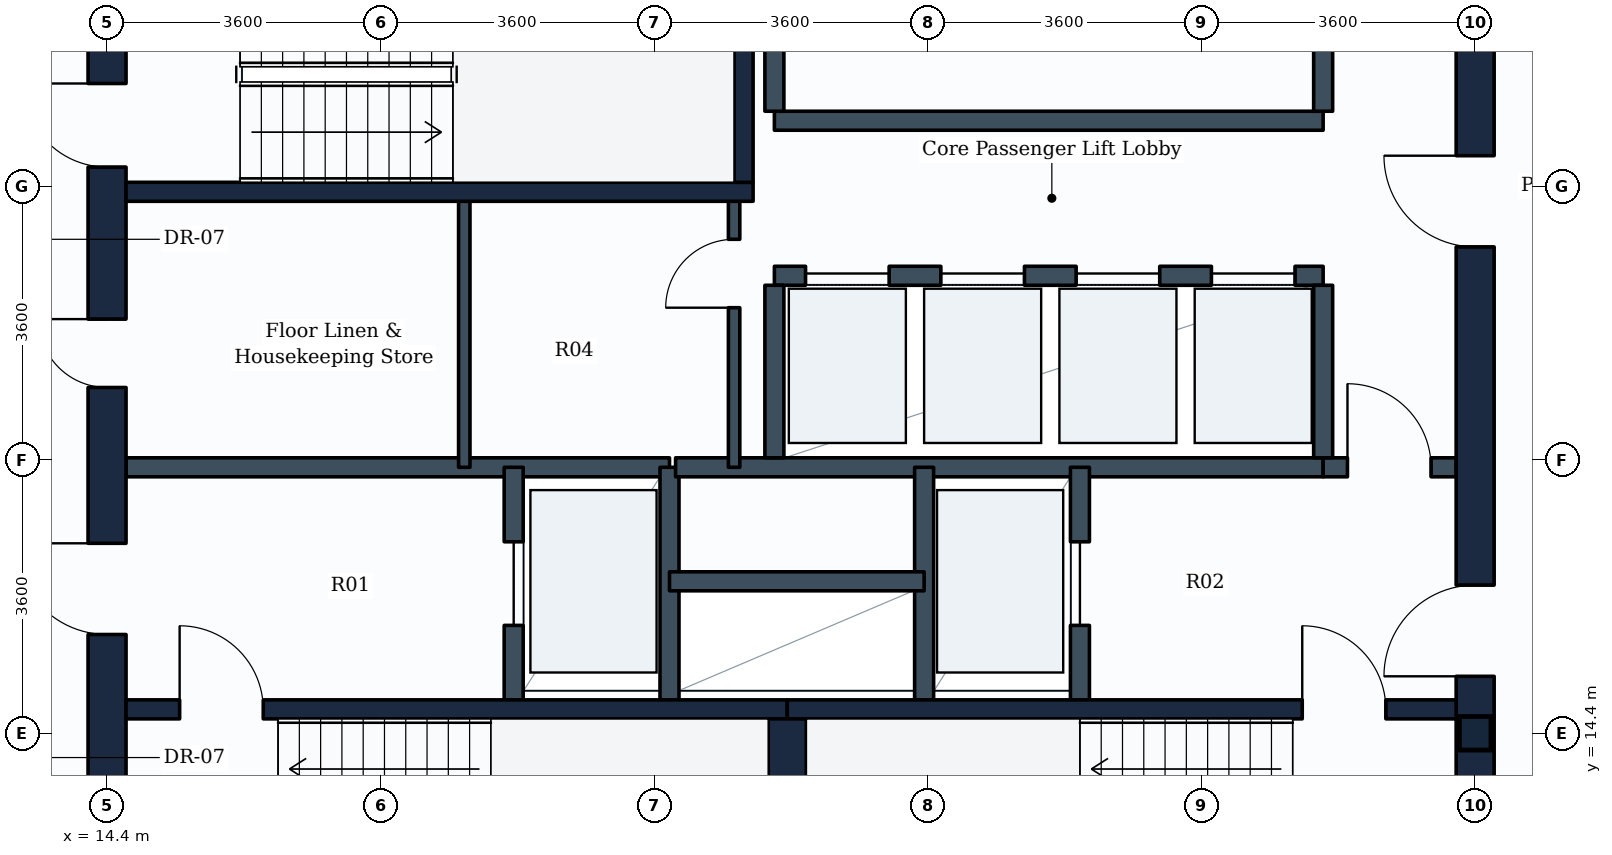
"""IFC4 building model, lengths in metres.
Left out: names, types, materials, properties, quantities, classifications, styles, units other than length and angle.
Written with IfcOpenShell. Run it as: python <this file> out.ifc"""

import sys

from ifc_helpers import new_model, si_unit, direction, frame, frame_2d, origin, origin_2d, place, context, subcontext, project, spatial, rectangle, i_section, extrude, element, fill, save


model = new_model("IFC4")
c1 = context("Model", 3, precision=1e-05, world=origin(), true_north=direction((0.0, 1.0)))
c2 = subcontext(c1, "Body", "Model", "MODEL_VIEW")
j1 = project(units=[si_unit("LENGTHUNIT", "METRE"), si_unit("PLANEANGLEUNIT", "RADIAN")], contexts=[c1])
p1 = place(None, origin())
s1 = spatial("IfcSite", under=j1, at=p1, CompositionType="ELEMENT")
p2 = place(p1, origin())
s2 = spatial("IfcBuilding", under=s1, at=p2, CompositionType="ELEMENT")
p3 = place(p2, frame((0.0, 0.0, 131.4)))
s3 = spatial("IfcBuildingStorey", under=s2, at=p3, CompositionType="ELEMENT", Elevation=131.4)
p4 = place(p3, frame((32.4, 14.4, 0.0), z_axis=(0.0, 0.0, 1.0), x_axis=(1.0, 0.0, 0.0)))
e1 = element("IfcColumn", 1, at=p4, inside=s3, PredefinedType="COLUMN", context=c2, shape_type="SweptSolid", body=[
    extrude(i_section(OverallWidth=0.416, OverallDepth=0.442, WebThickness=0.025, FlangeThickness=0.041, FilletRadius=0.015, at=origin_2d()), origin(), (0.0, 0.0, 1.0), 3.8),
])
p5 = place(p3, frame((14.4, 10.8, 0.0), z_axis=(0.0, 0.0, 1.0), x_axis=(0.0, 1.0, 0.0)))
e2 = element("IfcWall", 2, at=p5, inside=s3, PredefinedType="SHEAR", context=c2, shape_type="SweptSolid", body=[
    extrude(rectangle(XDim=14.4, YDim=0.5, at=frame_2d((7.2, 0.0))), origin(), (0.0, 0.0, 1.0), 3.55),
])
p6 = place(p5, frame((11.05, 0.0, 0.0)))
e3 = element("IfcOpeningElement", 3, at=p6, cuts=e2, PredefinedType="OPENING", context=c2, shape_type="SweptSolid", body=[
    extrude(rectangle(XDim=1.1, YDim=2.1, at=frame_2d((0.55, 1.05))), frame((0.0, 0.26, 0.0), z_axis=(0.0, -1.0, 0.0), x_axis=(1.0, 0.0, 0.0)), (0.0, 0.0, 1.0), 0.52),
])
p7 = place(p5, frame((4.9, 0.0, 0.0)))
e4 = element("IfcOpeningElement", 4, at=p7, cuts=e2, PredefinedType="OPENING", context=c2, shape_type="SweptSolid", body=[
    extrude(rectangle(XDim=1.2, YDim=2.1, at=frame_2d((0.6, 1.05))), frame((0.0, 0.26, 0.0), z_axis=(0.0, -1.0, 0.0), x_axis=(1.0, 0.0, 0.0)), (0.0, 0.0, 1.0), 0.52),
])
p8 = place(p5, frame((8.15, 0.0, 0.0)))
e5 = element("IfcOpeningElement", 5, at=p8, cuts=e2, PredefinedType="OPENING", context=c2, shape_type="SweptSolid", body=[
    extrude(rectangle(XDim=0.9, YDim=2.1, at=frame_2d((0.45, 1.05))), frame((0.0, 0.26, 0.0), z_axis=(0.0, -1.0, 0.0), x_axis=(1.0, 0.0, 0.0)), (0.0, 0.0, 1.0), 0.52),
])
p9 = place(p3, frame((32.4, 10.8, 0.0), z_axis=(0.0, 0.0, 1.0), x_axis=(0.0, 1.0, 0.0)))
e6 = element("IfcWall", 6, at=p9, inside=s3, PredefinedType="SHEAR", context=c2, shape_type="SweptSolid", body=[
    extrude(rectangle(XDim=14.4, YDim=0.5, at=frame_2d((7.2, 0.0))), origin(), (0.0, 0.0, 1.0), 3.55),
])
p10 = place(p9, frame((4.35, 0.0, 0.0)))
e7 = element("IfcOpeningElement", 7, at=p10, cuts=e6, PredefinedType="OPENING", context=c2, shape_type="SweptSolid", body=[
    extrude(rectangle(XDim=1.2, YDim=2.1, at=frame_2d((0.6, 1.05))), frame((0.0, 0.26, 0.0), z_axis=(0.0, -1.0, 0.0), x_axis=(1.0, 0.0, 0.0)), (0.0, 0.0, 1.0), 0.52),
])
p11 = place(p9, frame((10.0, 0.0, 0.0)))
e8 = element("IfcOpeningElement", 8, at=p11, cuts=e6, PredefinedType="OPENING", context=c2, shape_type="SweptSolid", body=[
    extrude(rectangle(XDim=1.2, YDim=2.1, at=frame_2d((0.6, 1.05))), frame((0.0, 0.26, 0.0), z_axis=(0.0, -1.0, 0.0), x_axis=(1.0, 0.0, 0.0)), (0.0, 0.0, 1.0), 0.52),
])
p12 = place(p3, frame((14.65, 14.715, 0.0), z_axis=(0.0, 0.0, 1.0), x_axis=(1.0, 0.0, 0.0)))
e9 = element("IfcWall", 9, at=p12, inside=s3, PredefinedType="SHEAR", context=c2, shape_type="SweptSolid", body=[
    extrude(rectangle(XDim=8.7, YDim=0.25, at=frame_2d((4.35, 0.0))), origin(), (0.0, 0.0, 1.0), 3.55),
])
p13 = place(p12, frame((0.705, 0.0, 0.0)))
e10 = element("IfcOpeningElement", 10, at=p13, cuts=e9, PredefinedType="OPENING", context=c2, shape_type="SweptSolid", body=[
    extrude(rectangle(XDim=1.1, YDim=2.1, at=frame_2d((0.55, 1.05))), frame((0.0, 0.135, 0.0), z_axis=(0.0, -1.0, 0.0), x_axis=(1.0, 0.0, 0.0)), (0.0, 0.0, 1.0), 0.27),
])
p14 = place(p3, frame((23.35, 14.715, 0.0), z_axis=(0.0, 0.0, 1.0), x_axis=(1.0, 0.0, 0.0)))
e11 = element("IfcWall", 11, at=p14, inside=s3, PredefinedType="SHEAR", context=c2, shape_type="SweptSolid", body=[
    extrude(rectangle(XDim=8.8, YDim=0.25, at=frame_2d((4.4, 0.0))), origin(), (0.0, 0.0, 1.0), 3.55),
])
p15 = place(p14, frame((6.775, 0.0, 0.0)))
e12 = element("IfcOpeningElement", 12, at=p15, cuts=e11, PredefinedType="OPENING", context=c2, shape_type="SweptSolid", body=[
    extrude(rectangle(XDim=1.1, YDim=2.1, at=frame_2d((0.55, 1.05))), frame((0.0, 0.135, 0.0), z_axis=(0.0, -1.0, 0.0), x_axis=(1.0, 0.0, 0.0)), (0.0, 0.0, 1.0), 0.27),
])
p16 = place(p3, frame((23.35, 11.75, 0.0), z_axis=(0.0, 0.0, 1.0), x_axis=(0.0, 1.0, 0.0)))
e13 = element("IfcWall", 13, at=p16, inside=s3, PredefinedType="SHEAR", context=c2, shape_type="SweptSolid", body=[
    extrude(rectangle(XDim=2.84, YDim=0.5, at=frame_2d((1.42, 0.0))), origin(), (0.0, 0.0, 1.0), 3.55),
])
p17 = place(p3, frame((14.65, 21.525, 0.0), z_axis=(0.0, 0.0, 1.0), x_axis=(1.0, 0.0, 0.0)))
e14 = element("IfcWall", 14, at=p17, inside=s3, PredefinedType="SHEAR", context=c2, shape_type="SweptSolid", body=[
    extrude(rectangle(XDim=8.25, YDim=0.25, at=frame_2d((4.125, 0.0))), origin(), (0.0, 0.0, 1.0), 3.55),
])
p18 = place(p3, frame((22.775, 21.65, 0.0), z_axis=(0.0, 0.0, 1.0), x_axis=(0.0, 1.0, 0.0)))
e15 = element("IfcWall", 15, at=p18, inside=s3, PredefinedType="SHEAR", context=c2, shape_type="SweptSolid", body=[
    extrude(rectangle(XDim=2.84, YDim=0.25, at=frame_2d((1.42, 0.0))), origin(), (0.0, 0.0, 1.0), 3.55),
])
p19 = place(p3, frame((14.65, 17.9, 0.0), z_axis=(0.0, 0.0, 1.0), x_axis=(1.0, 0.0, 0.0)))
e16 = element("IfcWall", 16, at=p19, inside=s3, PredefinedType="PARTITIONING", context=c2, shape_type="SweptSolid", body=[
    extrude(rectangle(XDim=7.15, YDim=0.25, at=frame_2d((3.575, 0.0))), origin(), (0.0, 0.0, 1.0), 3.535),
])
p20 = place(p3, frame((19.75, 14.84, 0.0), z_axis=(0.0, 0.0, 1.0), x_axis=(0.0, 1.0, 0.0)))
e17 = element("IfcWall", 17, at=p20, inside=s3, PredefinedType="PARTITIONING", context=c2, shape_type="SweptSolid", body=[
    extrude(rectangle(XDim=3.06, YDim=0.25, at=frame_2d((1.53, 0.0))), origin(), (0.0, 0.0, 1.0), 3.535),
])
p21 = place(p20, frame((0.98, 0.0, 0.0)))
e18 = element("IfcOpeningElement", 18, at=p21, cuts=e17, PredefinedType="OPENING", context=c2, shape_type="SweptSolid", body=[
    extrude(rectangle(XDim=1.1, YDim=2.1, at=frame_2d((0.55, 1.05))), frame((0.0, 0.135, 0.0), z_axis=(0.0, -1.0, 0.0), x_axis=(1.0, 0.0, 0.0)), (0.0, 0.0, 1.0), 0.27),
])
p22 = place(p3, frame((21.8, 14.84, 0.0), z_axis=(0.0, 0.0, 1.0), x_axis=(0.0, 1.0, 0.0)))
e19 = element("IfcWall", 19, at=p22, inside=s3, PredefinedType="PARTITIONING", context=c2, shape_type="SweptSolid", body=[
    extrude(rectangle(XDim=3.06, YDim=0.25, at=frame_2d((1.53, 0.0))), origin(), (0.0, 0.0, 1.0), 3.535),
])
p23 = place(p3, frame((21.88, 17.9, 0.0), z_axis=(0.0, 0.0, 1.0), x_axis=(1.0, 0.0, 0.0)))
e20 = element("IfcWall", 20, at=p23, inside=s3, PredefinedType="PARTITIONING", context=c2, shape_type="SweptSolid", body=[
    extrude(rectangle(XDim=8.52, YDim=0.25, at=frame_2d((4.26, 0.0))), origin(), (0.0, 0.0, 1.0), 3.535),
])
p24 = place(p3, frame((30.4, 17.9, 0.0), z_axis=(0.0, 0.0, 1.0), x_axis=(1.0, 0.0, 0.0)))
e21 = element("IfcWall", 21, at=p24, inside=s3, PredefinedType="PARTITIONING", context=c2, shape_type="SweptSolid", body=[
    extrude(rectangle(XDim=1.75, YDim=0.25, at=frame_2d((0.875, 0.0))), origin(), (0.0, 0.0, 1.0), 3.535),
])
p25 = place(p24, frame((0.32, 0.0, 0.0)))
e22 = element("IfcOpeningElement", 22, at=p25, cuts=e21, PredefinedType="OPENING", context=c2, shape_type="SweptSolid", body=[
    extrude(rectangle(XDim=1.1, YDim=2.1, at=frame_2d((0.55, 1.05))), frame((0.0, 0.135, 0.0), z_axis=(0.0, -1.0, 0.0), x_axis=(1.0, 0.0, 0.0)), (0.0, 0.0, 1.0), 0.27),
])
p26 = place(p3, frame((25.15, 14.84, 0.0), z_axis=(0.0, 0.0, 1.0), x_axis=(0.0, 1.0, 0.0)))
e23 = element("IfcWall", 23, at=p26, inside=s3, PredefinedType="PARTITIONING", context=c2, shape_type="SweptSolid", body=[
    extrude(rectangle(XDim=3.06, YDim=0.25, at=frame_2d((1.53, 0.0))), origin(), (0.0, 0.0, 1.0), 3.535),
])
p27 = place(p3, frame((27.2, 14.84, 0.0), z_axis=(0.0, 0.0, 1.0), x_axis=(0.0, 1.0, 0.0)))
e24 = element("IfcWall", 24, at=p27, inside=s3, PredefinedType="PARTITIONING", context=c2, shape_type="SweptSolid", body=[
    extrude(rectangle(XDim=3.06, YDim=0.25, at=frame_2d((1.53, 0.0))), origin(), (0.0, 0.0, 1.0), 3.535),
])
p28 = place(p27, frame((0.98, 0.0, 0.0)))
e25 = element("IfcOpeningElement", 25, at=p28, cuts=e24, PredefinedType="OPENING", context=c2, shape_type="SweptSolid", body=[
    extrude(rectangle(XDim=1.1, YDim=2.1, at=frame_2d((0.55, 1.05))), frame((0.0, 0.135, 0.0), z_axis=(0.0, -1.0, 0.0), x_axis=(1.0, 0.0, 0.0)), (0.0, 0.0, 1.0), 0.27),
])
p29 = place(p3, frame((21.8, 16.4, 0.0), z_axis=(0.0, 0.0, 1.0), x_axis=(1.0, 0.0, 0.0)))
e26 = element("IfcWall", 26, at=p29, inside=s3, PredefinedType="PARTITIONING", context=c2, shape_type="SweptSolid", body=[
    extrude(rectangle(XDim=3.35, YDim=0.25, at=frame_2d((1.675, 0.0))), origin(), (0.0, 0.0, 1.0), 3.535),
])
p30 = place(p3, frame((23.18, 20.42, 0.0), z_axis=(0.0, 0.0, 1.0), x_axis=(1.0, 0.0, 0.0)))
e27 = element("IfcWall", 27, at=p30, inside=s3, PredefinedType="PARTITIONING", context=c2, shape_type="SweptSolid", body=[
    extrude(rectangle(XDim=7.22, YDim=0.25, at=frame_2d((3.61, 0.0))), origin(), (0.0, 0.0, 1.0), 3.535),
])
p31 = place(p30, frame((0.41, 0.0, 0.0)))
e28 = element("IfcOpeningElement", 28, at=p31, cuts=e27, PredefinedType="OPENING", context=c2, shape_type="SweptSolid", body=[
    extrude(rectangle(XDim=1.1, YDim=2.1, at=frame_2d((0.55, 1.05))), frame((0.0, 0.135, 0.0), z_axis=(0.0, -1.0, 0.0), x_axis=(1.0, 0.0, 0.0)), (0.0, 0.0, 1.0), 0.27),
])
p32 = place(p30, frame((2.19, 0.0, 0.0)))
e29 = element("IfcOpeningElement", 29, at=p32, cuts=e27, PredefinedType="OPENING", context=c2, shape_type="SweptSolid", body=[
    extrude(rectangle(XDim=1.1, YDim=2.1, at=frame_2d((0.55, 1.05))), frame((0.0, 0.135, 0.0), z_axis=(0.0, -1.0, 0.0), x_axis=(1.0, 0.0, 0.0)), (0.0, 0.0, 1.0), 0.27),
])
p33 = place(p30, frame((3.97, 0.0, 0.0)))
e30 = element("IfcOpeningElement", 30, at=p33, cuts=e27, PredefinedType="OPENING", context=c2, shape_type="SweptSolid", body=[
    extrude(rectangle(XDim=1.1, YDim=2.1, at=frame_2d((0.55, 1.05))), frame((0.0, 0.135, 0.0), z_axis=(0.0, -1.0, 0.0), x_axis=(1.0, 0.0, 0.0)), (0.0, 0.0, 1.0), 0.27),
])
p34 = place(p30, frame((5.75, 0.0, 0.0)))
e31 = element("IfcOpeningElement", 31, at=p34, cuts=e27, PredefinedType="OPENING", context=c2, shape_type="SweptSolid", body=[
    extrude(rectangle(XDim=1.1, YDim=2.1, at=frame_2d((0.55, 1.05))), frame((0.0, 0.135, 0.0), z_axis=(0.0, -1.0, 0.0), x_axis=(1.0, 0.0, 0.0)), (0.0, 0.0, 1.0), 0.27),
])
for number, where, z_axis, x_axis in (
    (32, (23.18, 18.025, 0.0), (0.0, 0.0, 1.0), (0.0, 1.0, 0.0)),
    (33, (30.4, 18.025, 0.0), (0.0, 0.0, 1.0), (0.0, 1.0, 0.0)),
):
    element("IfcWall", number, at=place(p3, frame(where, z_axis=z_axis, x_axis=x_axis)), inside=s3, PredefinedType="PARTITIONING", context=c2, shape_type="SweptSolid", body=[
        extrude(rectangle(XDim=2.27, YDim=0.25, at=frame_2d((1.135, 0.0))), origin(), (0.0, 0.0, 1.0), 3.535),
    ])
p35 = place(p3, frame((23.18, 22.46, 0.0), z_axis=(0.0, 0.0, 1.0), x_axis=(1.0, 0.0, 0.0)))
e34 = element("IfcWall", 34, at=p35, inside=s3, PredefinedType="PARTITIONING", context=c2, shape_type="SweptSolid", body=[
    extrude(rectangle(XDim=7.22, YDim=0.25, at=frame_2d((3.61, 0.0))), origin(), (0.0, 0.0, 1.0), 3.535),
])
for number, where, z_axis, x_axis in (
    (35, (23.18, 22.585, 0.0), (0.0, 0.0, 1.0), (0.0, 1.0, 0.0)),
    (36, (30.4, 22.585, 0.0), (0.0, 0.0, 1.0), (0.0, 1.0, 0.0)),
):
    element("IfcWall", number, at=place(p3, frame(where, z_axis=z_axis, x_axis=x_axis)), inside=s3, PredefinedType="PARTITIONING", context=c2, shape_type="SweptSolid", body=[
        extrude(rectangle(XDim=2.315, YDim=0.25, at=frame_2d((1.157, 0.0))), origin(), (0.0, 0.0, 1.0), 3.535),
    ])
p36 = place(p3, frame((22.65, 17.9, 0.0), z_axis=(0.0, 0.0, 1.0), x_axis=(0.0, 1.0, 0.0)))
e37 = element("IfcWall", 37, at=p36, inside=s3, PredefinedType="PARTITIONING", context=c2, shape_type="SweptSolid", body=[
    extrude(rectangle(XDim=3.625, YDim=0.15, at=frame_2d((1.812, 0.0))), origin(), (0.0, 0.0, 1.0), 3.535),
])
p37 = place(p36, frame((2.1, 0.0, 0.0)))
e38 = element("IfcOpeningElement", 38, at=p37, cuts=e37, PredefinedType="OPENING", context=c2, shape_type="SweptSolid", body=[
    extrude(rectangle(XDim=0.9, YDim=2.1, at=frame_2d((0.45, 1.05))), frame((0.0, 0.085, 0.0), z_axis=(0.0, -1.0, 0.0), x_axis=(1.0, 0.0, 0.0)), (0.0, 0.0, 1.0), 0.17),
])
p38 = place(p3, frame((19.1, 17.9, 0.0), z_axis=(0.0, 0.0, 1.0), x_axis=(0.0, 1.0, 0.0)))
e39 = element("IfcWall", 39, at=p38, inside=s3, PredefinedType="PARTITIONING", context=c2, shape_type="SweptSolid", body=[
    extrude(rectangle(XDim=3.625, YDim=0.15, at=frame_2d((1.812, 0.0))), origin(), (0.0, 0.0, 1.0), 3.535),
])
p39 = place(p13, origin())
e40 = element("IfcDoor", 40, at=p39, inside=s3, OperationType="SINGLE_SWING_LEFT", PredefinedType="DOOR", context=c2, shape_type="SweptSolid", body=[
    extrude(rectangle(XDim=1.1, YDim=2.1, at=frame_2d((0.55, 1.05))), frame((0.0, 0.025, 0.0), z_axis=(0.0, -1.0, 0.0), x_axis=(1.0, 0.0, 0.0)), (0.0, 0.0, 1.0), 0.05),
])
fill(e10, e40)
p40 = place(p15, origin())
e41 = element("IfcDoor", 41, at=p40, inside=s3, OperationType="SINGLE_SWING_LEFT", PredefinedType="DOOR", context=c2, shape_type="SweptSolid", body=[
    extrude(rectangle(XDim=1.1, YDim=2.1, at=frame_2d((0.55, 1.05))), frame((0.0, 0.025, 0.0), z_axis=(0.0, -1.0, 0.0), x_axis=(1.0, 0.0, 0.0)), (0.0, 0.0, 1.0), 0.05),
])
fill(e12, e41)
p41 = place(p6, origin())
e42 = element("IfcDoor", 42, at=p41, inside=s3, OperationType="SINGLE_SWING_RIGHT", PredefinedType="DOOR", context=c2, shape_type="SweptSolid", body=[
    extrude(rectangle(XDim=1.1, YDim=2.1, at=frame_2d((0.55, 1.05))), frame((0.0, 0.025, 0.0), z_axis=(0.0, -1.0, 0.0), x_axis=(1.0, 0.0, 0.0)), (0.0, 0.0, 1.0), 0.05),
])
fill(e3, e42)
p42 = place(p21, origin())
e43 = element("IfcDoor", 43, at=p42, inside=s3, OperationType="SLIDING_TO_LEFT", PredefinedType="DOOR", context=c2, shape_type="SweptSolid", body=[
    extrude(rectangle(XDim=1.1, YDim=2.1, at=frame_2d((0.55, 1.05))), frame((0.0, 0.025, 0.0), z_axis=(0.0, -1.0, 0.0), x_axis=(1.0, 0.0, 0.0)), (0.0, 0.0, 1.0), 0.05),
])
fill(e18, e43)
p43 = place(p28, origin())
e44 = element("IfcDoor", 44, at=p43, inside=s3, OperationType="SLIDING_TO_LEFT", PredefinedType="DOOR", context=c2, shape_type="SweptSolid", body=[
    extrude(rectangle(XDim=1.1, YDim=2.1, at=frame_2d((0.55, 1.05))), frame((0.0, 0.025, 0.0), z_axis=(0.0, -1.0, 0.0), x_axis=(1.0, 0.0, 0.0)), (0.0, 0.0, 1.0), 0.05),
])
fill(e25, e44)
p44 = place(p7, origin())
e45 = element("IfcDoor", 45, at=p44, inside=s3, OperationType="SINGLE_SWING_RIGHT", PredefinedType="DOOR", context=c2, shape_type="SweptSolid", body=[
    extrude(rectangle(XDim=1.2, YDim=2.1, at=frame_2d((0.6, 1.05))), frame((0.0, 0.025, 0.0), z_axis=(0.0, -1.0, 0.0), x_axis=(1.0, 0.0, 0.0)), (0.0, 0.0, 1.0), 0.05),
])
fill(e4, e45)
p45 = place(p10, origin())
e46 = element("IfcDoor", 46, at=p45, inside=s3, OperationType="SINGLE_SWING_LEFT", PredefinedType="DOOR", context=c2, shape_type="SweptSolid", body=[
    extrude(rectangle(XDim=1.2, YDim=2.1, at=frame_2d((0.6, 1.05))), frame((0.0, 0.025, 0.0), z_axis=(0.0, -1.0, 0.0), x_axis=(1.0, 0.0, 0.0)), (0.0, 0.0, 1.0), 0.05),
])
fill(e7, e46)
p46 = place(p25, origin())
e47 = element("IfcDoor", 47, at=p46, inside=s3, OperationType="SINGLE_SWING_LEFT", PredefinedType="DOOR", context=c2, shape_type="SweptSolid", body=[
    extrude(rectangle(XDim=1.1, YDim=2.1, at=frame_2d((0.55, 1.05))), frame((0.0, 0.025, 0.0), z_axis=(0.0, -1.0, 0.0), x_axis=(1.0, 0.0, 0.0)), (0.0, 0.0, 1.0), 0.05),
])
fill(e22, e47)
p47 = place(p31, origin())
e48 = element("IfcDoor", 48, at=p47, inside=s3, OperationType="SLIDING_TO_LEFT", PredefinedType="DOOR", context=c2, shape_type="SweptSolid", body=[
    extrude(rectangle(XDim=1.1, YDim=2.1, at=frame_2d((0.55, 1.05))), frame((0.0, 0.025, 0.0), z_axis=(0.0, -1.0, 0.0), x_axis=(1.0, 0.0, 0.0)), (0.0, 0.0, 1.0), 0.05),
])
fill(e28, e48)
p48 = place(p32, origin())
e49 = element("IfcDoor", 49, at=p48, inside=s3, OperationType="SLIDING_TO_LEFT", PredefinedType="DOOR", context=c2, shape_type="SweptSolid", body=[
    extrude(rectangle(XDim=1.1, YDim=2.1, at=frame_2d((0.55, 1.05))), frame((0.0, 0.025, 0.0), z_axis=(0.0, -1.0, 0.0), x_axis=(1.0, 0.0, 0.0)), (0.0, 0.0, 1.0), 0.05),
])
fill(e29, e49)
p49 = place(p33, origin())
e50 = element("IfcDoor", 50, at=p49, inside=s3, OperationType="SLIDING_TO_LEFT", PredefinedType="DOOR", context=c2, shape_type="SweptSolid", body=[
    extrude(rectangle(XDim=1.1, YDim=2.1, at=frame_2d((0.55, 1.05))), frame((0.0, 0.025, 0.0), z_axis=(0.0, -1.0, 0.0), x_axis=(1.0, 0.0, 0.0)), (0.0, 0.0, 1.0), 0.05),
])
fill(e30, e50)
p50 = place(p34, origin())
e51 = element("IfcDoor", 51, at=p50, inside=s3, OperationType="SLIDING_TO_LEFT", PredefinedType="DOOR", context=c2, shape_type="SweptSolid", body=[
    extrude(rectangle(XDim=1.1, YDim=2.1, at=frame_2d((0.55, 1.05))), frame((0.0, 0.025, 0.0), z_axis=(0.0, -1.0, 0.0), x_axis=(1.0, 0.0, 0.0)), (0.0, 0.0, 1.0), 0.05),
])
fill(e31, e51)
p51 = place(p11, origin())
e52 = element("IfcDoor", 52, at=p51, inside=s3, OperationType="SINGLE_SWING_RIGHT", PredefinedType="DOOR", context=c2, shape_type="SweptSolid", body=[
    extrude(rectangle(XDim=1.2, YDim=2.1, at=frame_2d((0.6, 1.05))), frame((0.0, 0.025, 0.0), z_axis=(0.0, -1.0, 0.0), x_axis=(1.0, 0.0, 0.0)), (0.0, 0.0, 1.0), 0.05),
])
fill(e8, e52)
p52 = place(p8, origin())
e53 = element("IfcDoor", 53, at=p52, inside=s3, OperationType="SINGLE_SWING_RIGHT", PredefinedType="DOOR", context=c2, shape_type="SweptSolid", body=[
    extrude(rectangle(XDim=0.9, YDim=2.1, at=frame_2d((0.45, 1.05))), frame((0.0, 0.025, 0.0), z_axis=(0.0, -1.0, 0.0), x_axis=(1.0, 0.0, 0.0)), (0.0, 0.0, 1.0), 0.05),
])
fill(e5, e53)
p53 = place(p37, origin())
e54 = element("IfcDoor", 54, at=p53, inside=s3, OperationType="SINGLE_SWING_LEFT", PredefinedType="DOOR", context=c2, shape_type="SweptSolid", body=[
    extrude(rectangle(XDim=0.9, YDim=2.1, at=frame_2d((0.45, 1.05))), frame((0.0, 0.025, 0.0), z_axis=(0.0, -1.0, 0.0), x_axis=(1.0, 0.0, 0.0)), (0.0, 0.0, 1.0), 0.05),
])
fill(e38, e54)
save(model, sys.argv[1])
